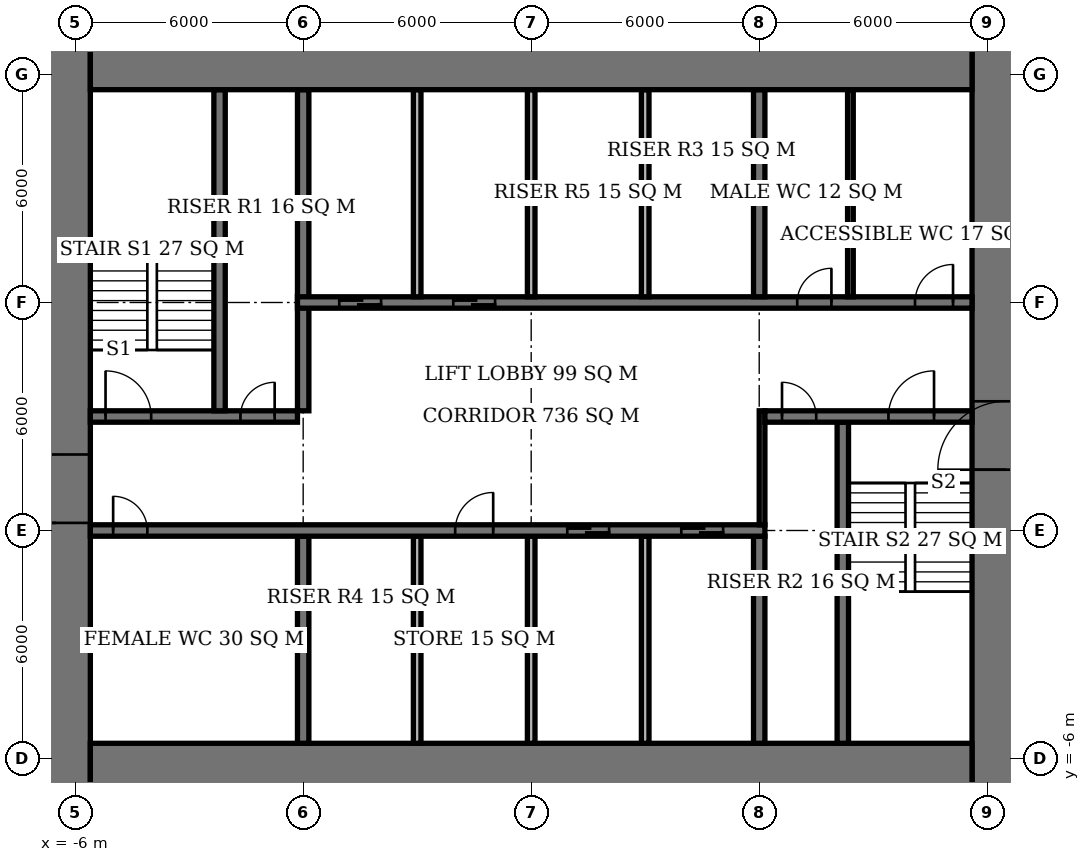
"""IFC4 building model, lengths in metres.
Left out: names, types, materials, properties, quantities, classifications, styles, units other than length and angle.
Written with IfcOpenShell. Run it as: python <this file> out.ifc"""

import sys

from ifc_helpers import new_model, si_unit, direction, frame, frame_2d, origin, place, context, subcontext, project, spatial, rectangle, extrude, element, fill, save


model = new_model("IFC4")
c1 = context("Model", 3, precision=1e-05, world=origin(), true_north=direction((0.0, 1.0)))
c2 = subcontext(c1, "Body", "Model", "MODEL_VIEW")
j1 = project(units=[si_unit("LENGTHUNIT", "METRE"), si_unit("PLANEANGLEUNIT", "RADIAN")], contexts=[c1])
p1 = place(None, origin())
s1 = spatial("IfcSite", under=j1, at=p1, CompositionType="ELEMENT")
p2 = place(p1, origin())
s2 = spatial("IfcBuilding", under=s1, at=p2, CompositionType="ELEMENT")
p3 = place(p2, frame((0.0, 0.0, 287.9)))
s3 = spatial("IfcBuildingStorey", under=s2, at=p3, CompositionType="ELEMENT", Elevation=287.9)
for number, where, z_axis, x_axis in (
    (1, (-5.6, -6.6, 0.0), (0.0, 0.0, 1.0), (1.0, 0.0, 0.0)),
    (2, (-5.6, 12.6, 0.0), (0.0, 0.0, 1.0), (1.0, 0.0, 0.0)),
):
    element("IfcWall", number, at=place(p3, frame(where, z_axis=z_axis, x_axis=x_axis)), inside=s3, PredefinedType="SHEAR", context=c2, shape_type="SweptSolid", body=[
        extrude(rectangle(XDim=23.2, YDim=2.0, at=frame_2d((11.6, 0.0))), origin(), (0.0, 0.0, 1.0), 3.9),
    ])
p4 = place(p3, frame((-6.5, -7.6, 0.0), z_axis=(0.0, 0.0, 1.0), x_axis=(0.0, 1.0, 0.0)))
e3 = element("IfcWall", 3, at=p4, inside=s3, PredefinedType="SHEAR", context=c2, shape_type="SweptSolid", body=[
    extrude(rectangle(XDim=21.2, YDim=1.8, at=frame_2d((10.6, 0.0))), origin(), (0.0, 0.0, 1.0), 3.9),
])
p5 = place(p4, frame((7.8, 0.0, 0.0)))
e4 = element("IfcOpeningElement", 4, at=p5, cuts=e3, PredefinedType="OPENING", context=c2, shape_type="SweptSolid", body=[
    extrude(rectangle(XDim=1.8, YDim=2.4, at=frame_2d((0.9, 1.2))), frame((0.0, 0.91, 0.0), z_axis=(0.0, -1.0, 0.0), x_axis=(1.0, 0.0, 0.0)), (0.0, 0.0, 1.0), 1.82),
])
p6 = place(p3, frame((18.5, -7.6, 0.0), z_axis=(0.0, 0.0, 1.0), x_axis=(0.0, 1.0, 0.0)))
e5 = element("IfcWall", 5, at=p6, inside=s3, PredefinedType="SHEAR", context=c2, shape_type="SweptSolid", body=[
    extrude(rectangle(XDim=21.2, YDim=1.8, at=frame_2d((10.6, 0.0))), origin(), (0.0, 0.0, 1.0), 3.9),
])
p7 = place(p6, frame((9.2, 0.0, 0.0)))
e6 = element("IfcOpeningElement", 6, at=p7, cuts=e5, PredefinedType="OPENING", context=c2, shape_type="SweptSolid", body=[
    extrude(rectangle(XDim=1.8, YDim=2.4, at=frame_2d((0.9, 1.2))), frame((0.0, 0.91, 0.0), z_axis=(0.0, -1.0, 0.0), x_axis=(1.0, 0.0, 0.0)), (0.0, 0.0, 1.0), 1.82),
])
p8 = place(p3, frame((-5.6, 0.0, 0.0), z_axis=(0.0, 0.0, 1.0), x_axis=(1.0, 0.0, 0.0)))
e7 = element("IfcWall", 7, at=p8, inside=s3, PredefinedType="SHEAR", context=c2, shape_type="SweptSolid", body=[
    extrude(rectangle(XDim=17.75, YDim=0.3, at=frame_2d((8.875, 0.0))), origin(), (0.0, 0.0, 1.0), 3.9),
])
p9 = place(p8, frame((0.6, 0.0, 0.0)))
e8 = element("IfcOpeningElement", 8, at=p9, cuts=e7, PredefinedType="OPENING", context=c2, shape_type="SweptSolid", body=[
    extrude(rectangle(XDim=0.9, YDim=2.1, at=frame_2d((0.45, 1.05))), frame((0.0, 0.16, 0.0), z_axis=(0.0, -1.0, 0.0), x_axis=(1.0, 0.0, 0.0)), (0.0, 0.0, 1.0), 0.32),
])
p10 = place(p8, frame((9.6, 0.0, 0.0)))
e9 = element("IfcOpeningElement", 9, at=p10, cuts=e7, PredefinedType="OPENING", context=c2, shape_type="SweptSolid", body=[
    extrude(rectangle(XDim=1.0, YDim=2.1, at=frame_2d((0.5, 1.05))), frame((0.0, 0.16, 0.0), z_axis=(0.0, -1.0, 0.0), x_axis=(1.0, 0.0, 0.0)), (0.0, 0.0, 1.0), 0.32),
])
p11 = place(p8, frame((12.55, 0.0, 0.0)))
e10 = element("IfcOpeningElement", 10, at=p11, cuts=e7, PredefinedType="OPENING", context=c2, shape_type="SweptSolid", body=[
    extrude(rectangle(XDim=1.1, YDim=2.1, at=frame_2d((0.55, 1.05))), frame((0.0, 0.16, 0.0), z_axis=(0.0, -1.0, 0.0), x_axis=(1.0, 0.0, 0.0)), (0.0, 0.0, 1.0), 0.32),
])
p12 = place(p8, frame((15.55, 0.0, 0.0)))
e11 = element("IfcOpeningElement", 11, at=p12, cuts=e7, PredefinedType="OPENING", context=c2, shape_type="SweptSolid", body=[
    extrude(rectangle(XDim=1.1, YDim=2.1, at=frame_2d((0.55, 1.05))), frame((0.0, 0.16, 0.0), z_axis=(0.0, -1.0, 0.0), x_axis=(1.0, 0.0, 0.0)), (0.0, 0.0, 1.0), 0.32),
])
p13 = place(p3, frame((-5.6, 3.0, 0.0), z_axis=(0.0, 0.0, 1.0), x_axis=(1.0, 0.0, 0.0)))
e12 = element("IfcWall", 12, at=p13, inside=s3, PredefinedType="SHEAR", context=c2, shape_type="SweptSolid", body=[
    extrude(rectangle(XDim=5.45, YDim=0.3, at=frame_2d((2.725, 0.0))), origin(), (0.0, 0.0, 1.0), 3.9),
])
p14 = place(p13, frame((0.4, 0.0, 0.0)))
e13 = element("IfcOpeningElement", 13, at=p14, cuts=e12, PredefinedType="OPENING", context=c2, shape_type="SweptSolid", body=[
    extrude(rectangle(XDim=1.2, YDim=2.1, at=frame_2d((0.6, 1.05))), frame((0.0, 0.16, 0.0), z_axis=(0.0, -1.0, 0.0), x_axis=(1.0, 0.0, 0.0)), (0.0, 0.0, 1.0), 0.32),
])
p15 = place(p13, frame((3.95, 0.0, 0.0)))
e14 = element("IfcOpeningElement", 14, at=p15, cuts=e12, PredefinedType="OPENING", context=c2, shape_type="SweptSolid", body=[
    extrude(rectangle(XDim=0.9, YDim=2.1, at=frame_2d((0.45, 1.05))), frame((0.0, 0.16, 0.0), z_axis=(0.0, -1.0, 0.0), x_axis=(1.0, 0.0, 0.0)), (0.0, 0.0, 1.0), 0.32),
])
p16 = place(p3, frame((12.15, 3.0, 0.0), z_axis=(0.0, 0.0, 1.0), x_axis=(1.0, 0.0, 0.0)))
e15 = element("IfcWall", 15, at=p16, inside=s3, PredefinedType="SHEAR", context=c2, shape_type="SweptSolid", body=[
    extrude(rectangle(XDim=5.45, YDim=0.3, at=frame_2d((2.725, 0.0))), origin(), (0.0, 0.0, 1.0), 3.9),
])
p17 = place(p16, frame((3.25, 0.0, 0.0)))
e16 = element("IfcOpeningElement", 16, at=p17, cuts=e15, PredefinedType="OPENING", context=c2, shape_type="SweptSolid", body=[
    extrude(rectangle(XDim=1.2, YDim=2.1, at=frame_2d((0.6, 1.05))), frame((0.0, 0.16, 0.0), z_axis=(0.0, -1.0, 0.0), x_axis=(1.0, 0.0, 0.0)), (0.0, 0.0, 1.0), 0.32),
])
p18 = place(p16, frame((0.45, 0.0, 0.0)))
e17 = element("IfcOpeningElement", 17, at=p18, cuts=e15, PredefinedType="OPENING", context=c2, shape_type="SweptSolid", body=[
    extrude(rectangle(XDim=0.9, YDim=2.1, at=frame_2d((0.45, 1.05))), frame((0.0, 0.16, 0.0), z_axis=(0.0, -1.0, 0.0), x_axis=(1.0, 0.0, 0.0)), (0.0, 0.0, 1.0), 0.32),
])
p19 = place(p3, frame((-0.15, 6.0, 0.0), z_axis=(0.0, 0.0, 1.0), x_axis=(1.0, 0.0, 0.0)))
e18 = element("IfcWall", 18, at=p19, inside=s3, PredefinedType="SHEAR", context=c2, shape_type="SweptSolid", body=[
    extrude(rectangle(XDim=17.75, YDim=0.3, at=frame_2d((8.875, 0.0))), origin(), (0.0, 0.0, 1.0), 3.9),
])
p20 = place(p19, frame((13.15, 0.0, 0.0)))
e19 = element("IfcOpeningElement", 19, at=p20, cuts=e18, PredefinedType="OPENING", context=c2, shape_type="SweptSolid", body=[
    extrude(rectangle(XDim=0.9, YDim=2.1, at=frame_2d((0.45, 1.05))), frame((0.0, 0.16, 0.0), z_axis=(0.0, -1.0, 0.0), x_axis=(1.0, 0.0, 0.0)), (0.0, 0.0, 1.0), 0.32),
])
p21 = place(p19, frame((16.25, 0.0, 0.0)))
e20 = element("IfcOpeningElement", 20, at=p21, cuts=e18, PredefinedType="OPENING", context=c2, shape_type="SweptSolid", body=[
    extrude(rectangle(XDim=1.0, YDim=2.1, at=frame_2d((0.5, 1.05))), frame((0.0, 0.16, 0.0), z_axis=(0.0, -1.0, 0.0), x_axis=(1.0, 0.0, 0.0)), (0.0, 0.0, 1.0), 0.32),
])
p22 = place(p19, frame((1.1, 0.0, 0.0)))
e21 = element("IfcOpeningElement", 21, at=p22, cuts=e18, PredefinedType="OPENING", context=c2, shape_type="SweptSolid", body=[
    extrude(rectangle(XDim=1.1, YDim=2.1, at=frame_2d((0.55, 1.05))), frame((0.0, 0.16, 0.0), z_axis=(0.0, -1.0, 0.0), x_axis=(1.0, 0.0, 0.0)), (0.0, 0.0, 1.0), 0.32),
])
p23 = place(p19, frame((4.1, 0.0, 0.0)))
e22 = element("IfcOpeningElement", 22, at=p23, cuts=e18, PredefinedType="OPENING", context=c2, shape_type="SweptSolid", body=[
    extrude(rectangle(XDim=1.1, YDim=2.1, at=frame_2d((0.55, 1.05))), frame((0.0, 0.16, 0.0), z_axis=(0.0, -1.0, 0.0), x_axis=(1.0, 0.0, 0.0)), (0.0, 0.0, 1.0), 0.32),
])
p24 = place(p3, frame((0.0, -5.6, 0.0), z_axis=(0.0, 0.0, 1.0), x_axis=(0.0, 1.0, 0.0)))
e23 = element("IfcWall", 23, at=p24, inside=s3, PredefinedType="SHEAR", context=c2, shape_type="SweptSolid", body=[
    extrude(rectangle(XDim=5.45, YDim=0.3, at=frame_2d((2.725, 0.0))), origin(), (0.0, 0.0, 1.0), 3.9),
])
p25 = place(p3, frame((0.0, 3.15, 0.0), z_axis=(0.0, 0.0, 1.0), x_axis=(0.0, 1.0, 0.0)))
e24 = element("IfcWall", 24, at=p25, inside=s3, PredefinedType="SHEAR", context=c2, shape_type="SweptSolid", body=[
    extrude(rectangle(XDim=8.45, YDim=0.3, at=frame_2d((4.225, 0.0))), origin(), (0.0, 0.0, 1.0), 3.9),
])
for number, where, z_axis, x_axis in (
    (25, (12.0, -5.6, 0.0), (0.0, 0.0, 1.0), (0.0, 1.0, 0.0)),
    (26, (12.0, 6.15, 0.0), (0.0, 0.0, 1.0), (0.0, 1.0, 0.0)),
):
    element("IfcWall", number, at=place(p3, frame(where, z_axis=z_axis, x_axis=x_axis)), inside=s3, PredefinedType="SHEAR", context=c2, shape_type="SweptSolid", body=[
        extrude(rectangle(XDim=5.45, YDim=0.3, at=frame_2d((2.725, 0.0))), origin(), (0.0, 0.0, 1.0), 3.9),
    ])
for number, where, z_axis, x_axis in (
    (27, (-2.2, 3.15, 0.0), (0.0, 0.0, 1.0), (0.0, 1.0, 0.0)),
    (28, (14.2, -5.6, 0.0), (0.0, 0.0, 1.0), (0.0, 1.0, 0.0)),
):
    element("IfcWall", number, at=place(p3, frame(where, z_axis=z_axis, x_axis=x_axis)), inside=s3, PredefinedType="SHEAR", context=c2, shape_type="SweptSolid", body=[
        extrude(rectangle(XDim=8.45, YDim=0.3, at=frame_2d((4.225, 0.0))), origin(), (0.0, 0.0, 1.0), 3.9),
    ])
for number, where, z_axis, x_axis in (
    (29, (3.0, 6.15, 0.0), (0.0, 0.0, 1.0), (0.0, 1.0, 0.0)),
    (30, (6.0, 6.15, 0.0), (0.0, 0.0, 1.0), (0.0, 1.0, 0.0)),
    (31, (9.0, 6.15, 0.0), (0.0, 0.0, 1.0), (0.0, 1.0, 0.0)),
    (32, (3.0, -5.6, 0.0), (0.0, 0.0, 1.0), (0.0, 1.0, 0.0)),
    (33, (6.0, -5.6, 0.0), (0.0, 0.0, 1.0), (0.0, 1.0, 0.0)),
    (34, (9.0, -5.6, 0.0), (0.0, 0.0, 1.0), (0.0, 1.0, 0.0)),
):
    element("IfcWall", number, at=place(p3, frame(where, z_axis=z_axis, x_axis=x_axis)), inside=s3, PredefinedType="SOLIDWALL", context=c2, shape_type="SweptSolid", body=[
        extrude(rectangle(XDim=5.45, YDim=0.2, at=frame_2d((2.725, 0.0))), origin(), (0.0, 0.0, 1.0), 3.9),
    ])
p26 = place(p3, frame((14.4, 6.15, 0.0), z_axis=(0.0, 0.0, 1.0), x_axis=(0.0, 1.0, 0.0)))
e35 = element("IfcWall", 35, at=p26, inside=s3, PredefinedType="PLUMBINGWALL", context=c2, shape_type="SweptSolid", body=[
    extrude(rectangle(XDim=5.45, YDim=0.15, at=frame_2d((2.725, 0.0))), origin(), (0.0, 0.0, 1.0), 3.65),
])
p27 = place(p3, frame((12.075, 0.15, 0.0), z_axis=(0.0, 0.0, 1.0), x_axis=(0.0, 1.0, 0.0)))
e36 = element("IfcWall", 36, at=p27, inside=s3, PredefinedType="PARTITIONING", context=c2, shape_type="SweptSolid", body=[
    extrude(rectangle(XDim=3.0, YDim=0.15, at=frame_2d((1.5, 0.0))), origin(), (0.0, 0.0, 1.0), 3.65),
])
p28 = place(p5, origin())
e37 = element("IfcDoor", 37, at=p28, inside=s3, OperationType="DOUBLE_DOOR_SINGLE_SWING", PredefinedType="DOOR", context=c2, shape_type="SweptSolid", body=[
    extrude(rectangle(XDim=1.8, YDim=2.4, at=frame_2d((0.9, 1.2))), frame((0.0, 0.025, 0.0), z_axis=(0.0, -1.0, 0.0), x_axis=(1.0, 0.0, 0.0)), (0.0, 0.0, 1.0), 0.05),
])
fill(e4, e37)
p29 = place(p7, origin())
e38 = element("IfcDoor", 38, at=p29, inside=s3, OperationType="DOUBLE_DOOR_SINGLE_SWING", PredefinedType="DOOR", context=c2, shape_type="SweptSolid", body=[
    extrude(rectangle(XDim=1.8, YDim=2.4, at=frame_2d((0.9, 1.2))), frame((0.0, 0.025, 0.0), z_axis=(0.0, -1.0, 0.0), x_axis=(1.0, 0.0, 0.0)), (0.0, 0.0, 1.0), 0.05),
])
fill(e6, e38)
p30 = place(p14, origin())
e39 = element("IfcDoor", 39, at=p30, inside=s3, OperationType="SINGLE_SWING_LEFT", PredefinedType="DOOR", context=c2, shape_type="SweptSolid", body=[
    extrude(rectangle(XDim=1.2, YDim=2.1, at=frame_2d((0.6, 1.05))), frame((0.0, 0.025, 0.0), z_axis=(0.0, -1.0, 0.0), x_axis=(1.0, 0.0, 0.0)), (0.0, 0.0, 1.0), 0.05),
])
fill(e13, e39)
p31 = place(p15, origin())
e40 = element("IfcDoor", 40, at=p31, inside=s3, OperationType="SINGLE_SWING_RIGHT", PredefinedType="DOOR", context=c2, shape_type="SweptSolid", body=[
    extrude(rectangle(XDim=0.9, YDim=2.1, at=frame_2d((0.45, 1.05))), frame((0.0, 0.025, 0.0), z_axis=(0.0, -1.0, 0.0), x_axis=(1.0, 0.0, 0.0)), (0.0, 0.0, 1.0), 0.05),
])
fill(e14, e40)
p32 = place(p17, origin())
e41 = element("IfcDoor", 41, at=p32, inside=s3, OperationType="SINGLE_SWING_RIGHT", PredefinedType="DOOR", context=c2, shape_type="SweptSolid", body=[
    extrude(rectangle(XDim=1.2, YDim=2.1, at=frame_2d((0.6, 1.05))), frame((0.0, 0.025, 0.0), z_axis=(0.0, -1.0, 0.0), x_axis=(1.0, 0.0, 0.0)), (0.0, 0.0, 1.0), 0.05),
])
fill(e16, e41)
p33 = place(p18, origin())
e42 = element("IfcDoor", 42, at=p33, inside=s3, OperationType="SINGLE_SWING_LEFT", PredefinedType="DOOR", context=c2, shape_type="SweptSolid", body=[
    extrude(rectangle(XDim=0.9, YDim=2.1, at=frame_2d((0.45, 1.05))), frame((0.0, 0.025, 0.0), z_axis=(0.0, -1.0, 0.0), x_axis=(1.0, 0.0, 0.0)), (0.0, 0.0, 1.0), 0.05),
])
fill(e17, e42)
p34 = place(p9, origin())
e43 = element("IfcDoor", 43, at=p34, inside=s3, OperationType="SINGLE_SWING_LEFT", PredefinedType="DOOR", context=c2, shape_type="SweptSolid", body=[
    extrude(rectangle(XDim=0.9, YDim=2.1, at=frame_2d((0.45, 1.05))), frame((0.0, 0.025, 0.0), z_axis=(0.0, -1.0, 0.0), x_axis=(1.0, 0.0, 0.0)), (0.0, 0.0, 1.0), 0.05),
])
fill(e8, e43)
p35 = place(p20, origin())
e44 = element("IfcDoor", 44, at=p35, inside=s3, OperationType="SINGLE_SWING_RIGHT", PredefinedType="DOOR", context=c2, shape_type="SweptSolid", body=[
    extrude(rectangle(XDim=0.9, YDim=2.1, at=frame_2d((0.45, 1.05))), frame((0.0, 0.025, 0.0), z_axis=(0.0, -1.0, 0.0), x_axis=(1.0, 0.0, 0.0)), (0.0, 0.0, 1.0), 0.05),
])
fill(e19, e44)
p36 = place(p21, origin())
e45 = element("IfcDoor", 45, at=p36, inside=s3, OperationType="SINGLE_SWING_RIGHT", PredefinedType="DOOR", context=c2, shape_type="SweptSolid", body=[
    extrude(rectangle(XDim=1.0, YDim=2.1, at=frame_2d((0.5, 1.05))), frame((0.0, 0.025, 0.0), z_axis=(0.0, -1.0, 0.0), x_axis=(1.0, 0.0, 0.0)), (0.0, 0.0, 1.0), 0.05),
])
fill(e20, e45)
p37 = place(p10, origin())
e46 = element("IfcDoor", 46, at=p37, inside=s3, OperationType="SINGLE_SWING_RIGHT", PredefinedType="DOOR", context=c2, shape_type="SweptSolid", body=[
    extrude(rectangle(XDim=1.0, YDim=2.1, at=frame_2d((0.5, 1.05))), frame((0.0, 0.025, 0.0), z_axis=(0.0, -1.0, 0.0), x_axis=(1.0, 0.0, 0.0)), (0.0, 0.0, 1.0), 0.05),
])
fill(e9, e46)
p38 = place(p22, origin())
e47 = element("IfcDoor", 47, at=p38, inside=s3, OperationType="DOUBLE_DOOR_SLIDING", PredefinedType="USERDEFINED", context=c2, shape_type="SweptSolid", body=[
    extrude(rectangle(XDim=1.1, YDim=2.1, at=frame_2d((0.55, 1.05))), frame((0.0, 0.025, 0.0), z_axis=(0.0, -1.0, 0.0), x_axis=(1.0, 0.0, 0.0)), (0.0, 0.0, 1.0), 0.05),
])
fill(e21, e47)
p39 = place(p23, origin())
e48 = element("IfcDoor", 48, at=p39, inside=s3, OperationType="DOUBLE_DOOR_SLIDING", PredefinedType="USERDEFINED", context=c2, shape_type="SweptSolid", body=[
    extrude(rectangle(XDim=1.1, YDim=2.1, at=frame_2d((0.55, 1.05))), frame((0.0, 0.025, 0.0), z_axis=(0.0, -1.0, 0.0), x_axis=(1.0, 0.0, 0.0)), (0.0, 0.0, 1.0), 0.05),
])
fill(e22, e48)
p40 = place(p11, origin())
e49 = element("IfcDoor", 49, at=p40, inside=s3, OperationType="DOUBLE_DOOR_SLIDING", PredefinedType="USERDEFINED", context=c2, shape_type="SweptSolid", body=[
    extrude(rectangle(XDim=1.1, YDim=2.1, at=frame_2d((0.55, 1.05))), frame((0.0, 0.025, 0.0), z_axis=(0.0, -1.0, 0.0), x_axis=(1.0, 0.0, 0.0)), (0.0, 0.0, 1.0), 0.05),
])
fill(e10, e49)
p41 = place(p12, origin())
e50 = element("IfcDoor", 50, at=p41, inside=s3, OperationType="DOUBLE_DOOR_SLIDING", PredefinedType="USERDEFINED", context=c2, shape_type="SweptSolid", body=[
    extrude(rectangle(XDim=1.1, YDim=2.1, at=frame_2d((0.55, 1.05))), frame((0.0, 0.025, 0.0), z_axis=(0.0, -1.0, 0.0), x_axis=(1.0, 0.0, 0.0)), (0.0, 0.0, 1.0), 0.05),
])
fill(e11, e50)
save(model, sys.argv[1])
